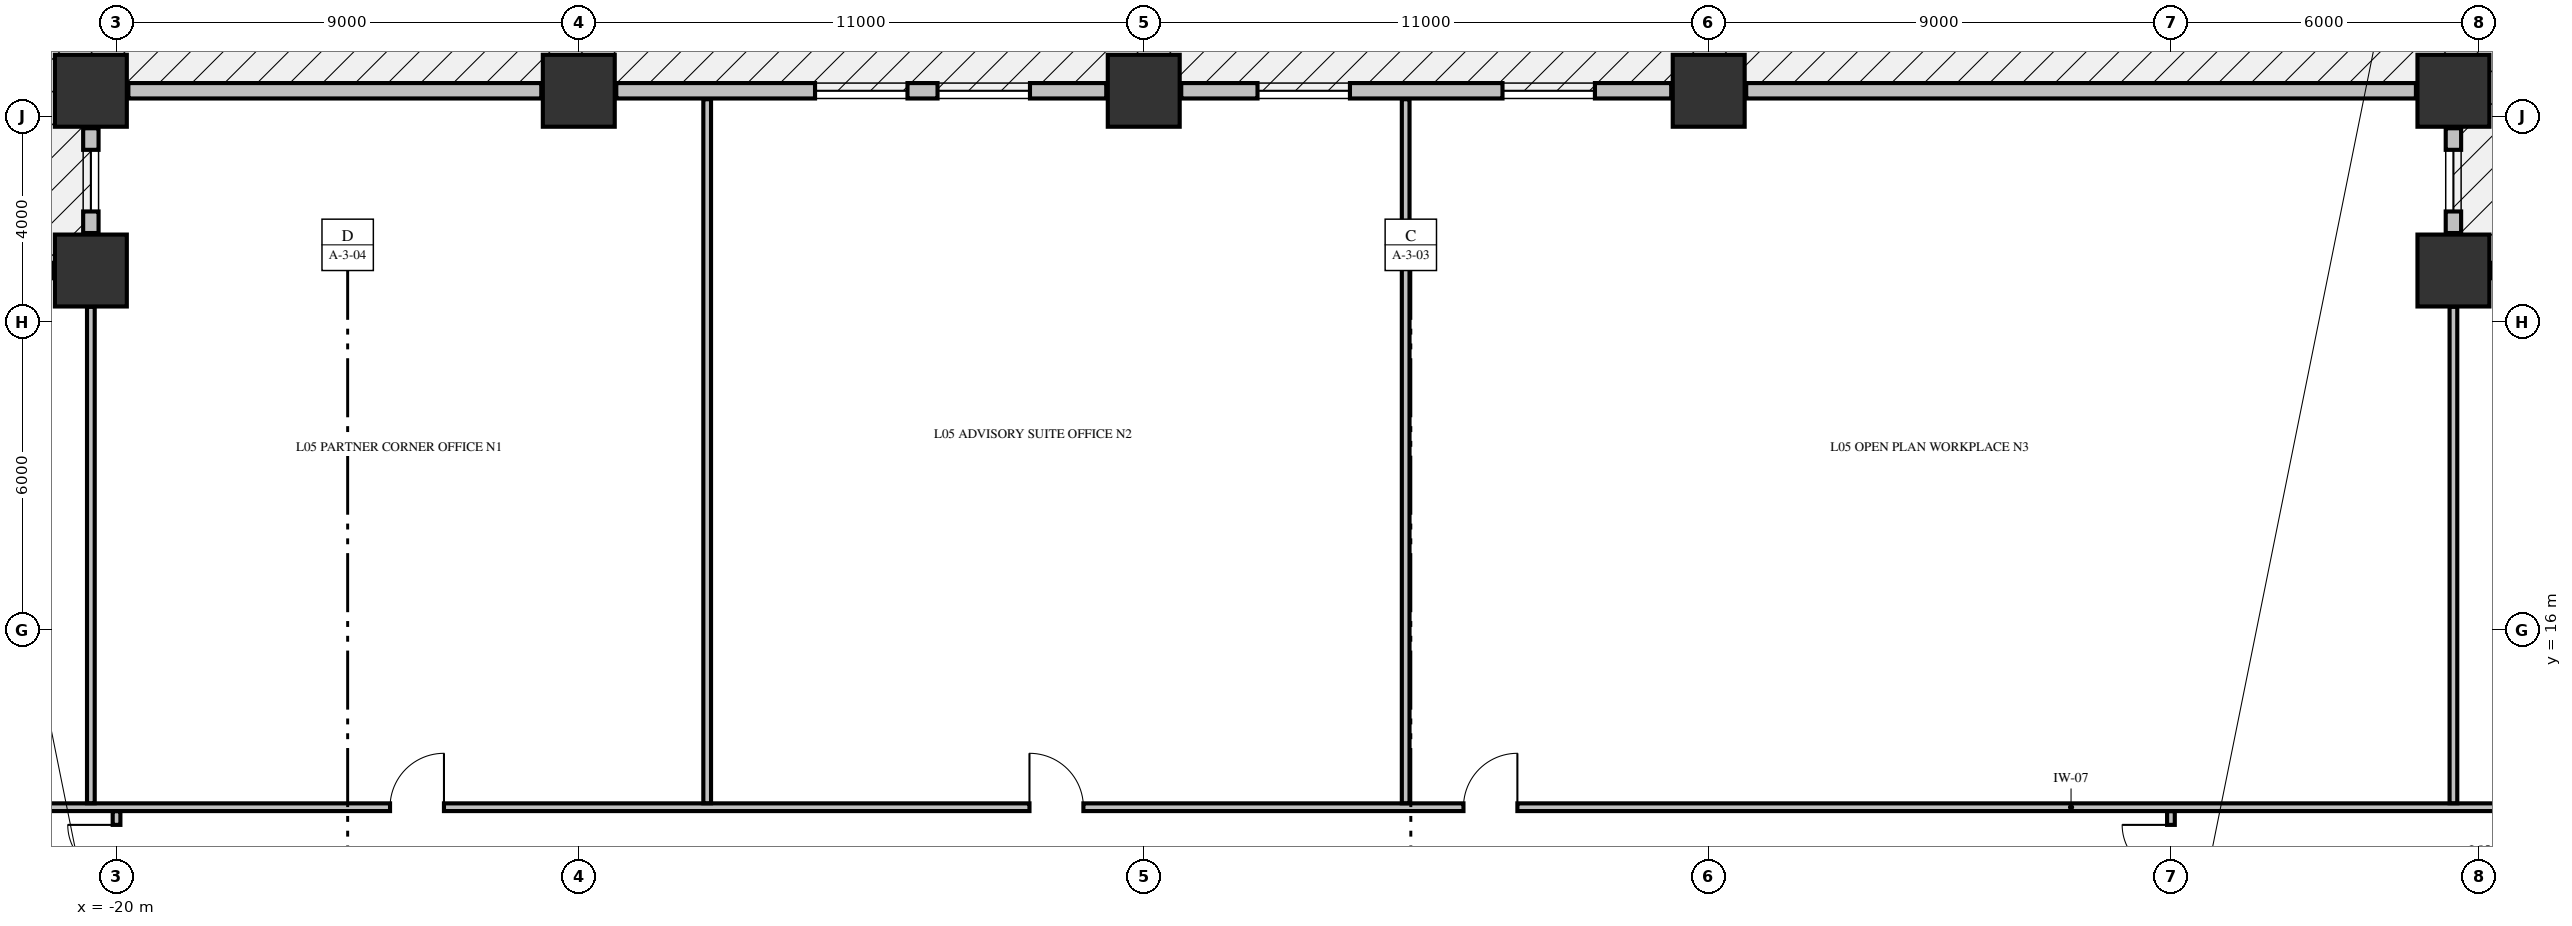
"""IFC4 building model, lengths in metres.
Left out: names, types, materials, properties, quantities, classifications, styles, units other than length and angle.
Written with IfcOpenShell. Run it as: python <this file> out.ifc"""

import sys

from ifc_helpers import new_model, si_unit, direction, frame, frame_2d, origin, origin_2d, place, context, subcontext, project, spatial, rectangle, extrude, element, fill, save


model = new_model("IFC4")
c1 = context("Model", 3, precision=1e-05, world=origin(), true_north=direction((0.0, 1.0)))
c2 = subcontext(c1, "Body", "Model", "MODEL_VIEW")
j1 = project(units=[si_unit("LENGTHUNIT", "METRE"), si_unit("PLANEANGLEUNIT", "RADIAN")], contexts=[c1])
p1 = place(None, origin())
s1 = spatial("IfcSite", under=j1, at=p1, CompositionType="ELEMENT")
p2 = place(p1, origin())
s2 = spatial("IfcBuilding", under=s1, at=p2, CompositionType="ELEMENT")
p3 = place(p2, frame((0.0, 0.0, 27.2)))
s3 = spatial("IfcBuildingStorey", under=s2, at=p3, CompositionType="ELEMENT", Elevation=27.2)
for number, where, z_axis, x_axis in (
    (1, (-20.5, 26.5, -0.45), (0.0, 0.0, 1.0), (1.0, 0.0, 0.0)),
    (2, (-11.0, 26.5, -0.45), (0.0, 0.0, 1.0), (1.0, 0.0, 0.0)),
    (3, (0.0, 26.5, -0.45), (0.0, 0.0, 1.0), (1.0, 0.0, 0.0)),
    (4, (11.0, 26.5, -0.45), (0.0, 0.0, 1.0), (1.0, 0.0, 0.0)),
    (5, (25.5, 26.5, -0.45), (0.0, 0.0, 1.0), (1.0, 0.0, 0.0)),
    (6, (25.5, 23.0, -0.45), (0.0, 0.0, 1.0), (1.0, 0.0, 0.0)),
    (7, (-20.5, 23.0, -0.45), (0.0, 0.0, 1.0), (1.0, 0.0, 0.0)),
):
    element("IfcColumn", number, at=place(p3, frame(where, z_axis=z_axis, x_axis=x_axis)), inside=s3, PredefinedType="COLUMN", context=c2, shape_type="SweptSolid", body=[
        extrude(rectangle(XDim=1.4, YDim=1.4, at=origin_2d()), origin(), (0.0, 0.0, 1.0), 3.77),
    ])
p4 = place(p3, frame((28.27, 23.0, 0.0), z_axis=(0.0, 0.0, 1.0), x_axis=(-1.0, 0.0, 0.0)))
e8 = element("IfcWall", 8, at=p4, inside=s3, PredefinedType="STANDARD", context=c2, shape_type="SweptSolid", body=[
    extrude(rectangle(XDim=2.04, YDim=0.3, at=frame_2d((1.02, 0.0))), origin(), (0.0, 0.0, 1.0), 2.712),
])
p5 = place(p4, frame((0.42, 0.0, 0.82)))
e9 = element("IfcOpeningElement", 9, at=p5, cuts=e8, PredefinedType="OPENING", context=c2, shape_type="SweptSolid", body=[
    extrude(rectangle(XDim=1.2, YDim=1.65, at=frame_2d((0.6, 0.825))), frame((0.0, 0.16, 0.0), z_axis=(0.0, -1.0, 0.0), x_axis=(1.0, 0.0, 0.0)), (0.0, 0.0, 1.0), 0.32),
])
p6 = place(p3, frame((25.5, 23.73, 0.0), z_axis=(0.0, 0.0, 1.0), x_axis=(0.0, 1.0, 0.0)))
e10 = element("IfcWall", 10, at=p6, inside=s3, PredefinedType="STANDARD", context=c2, shape_type="SweptSolid", body=[
    extrude(rectangle(XDim=2.04, YDim=0.3, at=frame_2d((1.02, 0.0))), origin(), (0.0, 0.0, 1.0), 2.712),
])
p7 = place(p6, frame((0.42, 0.0, 0.82)))
e11 = element("IfcOpeningElement", 11, at=p7, cuts=e10, PredefinedType="OPENING", context=c2, shape_type="SweptSolid", body=[
    extrude(rectangle(XDim=1.2, YDim=1.65, at=frame_2d((0.6, 0.825))), frame((0.0, 0.16, 0.0), z_axis=(0.0, -1.0, 0.0), x_axis=(1.0, 0.0, 0.0)), (0.0, 0.0, 1.0), 0.32),
])
p8 = place(p3, frame((-20.5, 25.77, 0.0), z_axis=(0.0, 0.0, 1.0), x_axis=(0.0, -1.0, 0.0)))
e12 = element("IfcWall", 12, at=p8, inside=s3, PredefinedType="STANDARD", context=c2, shape_type="SweptSolid", body=[
    extrude(rectangle(XDim=2.04, YDim=0.3, at=frame_2d((1.02, 0.0))), origin(), (0.0, 0.0, 1.0), 2.712),
])
p9 = place(p8, frame((0.42, 0.0, 0.82)))
e13 = element("IfcOpeningElement", 13, at=p9, cuts=e12, PredefinedType="OPENING", context=c2, shape_type="SweptSolid", body=[
    extrude(rectangle(XDim=1.2, YDim=1.65, at=frame_2d((0.6, 0.825))), frame((0.0, 0.16, 0.0), z_axis=(0.0, -1.0, 0.0), x_axis=(1.0, 0.0, 0.0)), (0.0, 0.0, 1.0), 0.32),
])
p10 = place(p3, frame((-21.23, 23.0, 0.0), z_axis=(0.0, 0.0, 1.0), x_axis=(-1.0, 0.0, 0.0)))
e14 = element("IfcWall", 14, at=p10, inside=s3, PredefinedType="STANDARD", context=c2, shape_type="SweptSolid", body=[
    extrude(rectangle(XDim=2.04, YDim=0.3, at=frame_2d((1.02, 0.0))), origin(), (0.0, 0.0, 1.0), 2.712),
])
p11 = place(p10, frame((0.42, 0.0, 0.82)))
e15 = element("IfcOpeningElement", 15, at=p11, cuts=e14, PredefinedType="OPENING", context=c2, shape_type="SweptSolid", body=[
    extrude(rectangle(XDim=1.2, YDim=1.65, at=frame_2d((0.6, 0.825))), frame((0.0, 0.16, 0.0), z_axis=(0.0, -1.0, 0.0), x_axis=(1.0, 0.0, 0.0)), (0.0, 0.0, 1.0), 0.32),
])
p12 = place(p3, frame((-11.73, 26.5, 0.0), z_axis=(0.0, 0.0, 1.0), x_axis=(-1.0, 0.0, 0.0)))
e16 = element("IfcWall", 16, at=p12, inside=s3, PredefinedType="STANDARD", context=c2, shape_type="SweptSolid", body=[
    extrude(rectangle(XDim=8.04, YDim=0.3, at=frame_2d((4.02, 0.0))), origin(), (0.0, 0.0, 1.0), 2.712),
])
p13 = place(p3, frame((-0.73, 26.5, 0.0), z_axis=(0.0, 0.0, 1.0), x_axis=(-1.0, 0.0, 0.0)))
e17 = element("IfcWall", 17, at=p13, inside=s3, PredefinedType="STANDARD", context=c2, shape_type="SweptSolid", body=[
    extrude(rectangle(XDim=9.54, YDim=0.3, at=frame_2d((4.77, 0.0))), origin(), (0.0, 0.0, 1.0), 2.712),
])
p14 = place(p13, frame((1.485, 0.0, 0.78)))
e18 = element("IfcOpeningElement", 18, at=p14, cuts=e17, PredefinedType="OPENING", context=c2, shape_type="SweptSolid", body=[
    extrude(rectangle(XDim=1.8, YDim=1.72, at=frame_2d((0.9, 0.86))), frame((0.0, 0.16, 0.0), z_axis=(0.0, -1.0, 0.0), x_axis=(1.0, 0.0, 0.0)), (0.0, 0.0, 1.0), 0.32),
])
p15 = place(p13, frame((3.87, 0.0, 0.78)))
e19 = element("IfcOpeningElement", 19, at=p15, cuts=e17, PredefinedType="OPENING", context=c2, shape_type="SweptSolid", body=[
    extrude(rectangle(XDim=1.8, YDim=1.72, at=frame_2d((0.9, 0.86))), frame((0.0, 0.16, 0.0), z_axis=(0.0, -1.0, 0.0), x_axis=(1.0, 0.0, 0.0)), (0.0, 0.0, 1.0), 0.32),
])
p16 = place(p3, frame((10.27, 26.5, 0.0), z_axis=(0.0, 0.0, 1.0), x_axis=(-1.0, 0.0, 0.0)))
e20 = element("IfcWall", 20, at=p16, inside=s3, PredefinedType="STANDARD", context=c2, shape_type="SweptSolid", body=[
    extrude(rectangle(XDim=9.54, YDim=0.3, at=frame_2d((4.77, 0.0))), origin(), (0.0, 0.0, 1.0), 2.712),
])
p17 = place(p16, frame((1.485, 0.0, 0.78)))
e21 = element("IfcOpeningElement", 21, at=p17, cuts=e20, PredefinedType="OPENING", context=c2, shape_type="SweptSolid", body=[
    extrude(rectangle(XDim=1.8, YDim=1.72, at=frame_2d((0.9, 0.86))), frame((0.0, 0.16, 0.0), z_axis=(0.0, -1.0, 0.0), x_axis=(1.0, 0.0, 0.0)), (0.0, 0.0, 1.0), 0.32),
])
p18 = place(p16, frame((6.255, 0.0, 0.78)))
e22 = element("IfcOpeningElement", 22, at=p18, cuts=e20, PredefinedType="OPENING", context=c2, shape_type="SweptSolid", body=[
    extrude(rectangle(XDim=1.8, YDim=1.72, at=frame_2d((0.9, 0.86))), frame((0.0, 0.16, 0.0), z_axis=(0.0, -1.0, 0.0), x_axis=(1.0, 0.0, 0.0)), (0.0, 0.0, 1.0), 0.32),
])
p19 = place(p3, frame((24.77, 26.5, 0.0), z_axis=(0.0, 0.0, 1.0), x_axis=(-1.0, 0.0, 0.0)))
e23 = element("IfcWall", 23, at=p19, inside=s3, PredefinedType="STANDARD", context=c2, shape_type="SweptSolid", body=[
    extrude(rectangle(XDim=13.04, YDim=0.3, at=frame_2d((6.52, 0.0))), origin(), (0.0, 0.0, 1.0), 2.712),
])
p20 = place(p3, frame((-23.835, 12.55, 0.0), z_axis=(0.0, 0.0, 1.0), x_axis=(1.0, 0.0, 0.0)))
e24 = element("IfcWall", 24, at=p20, inside=s3, PredefinedType="PARTITIONING", context=c2, shape_type="SweptSolid", body=[
    extrude(rectangle(XDim=52.67, YDim=0.15, at=frame_2d((26.335, 0.0))), origin(), (0.0, 0.0, 1.0), 3.32),
])
p21 = place(p20, frame((9.16, 0.0, 0.0)))
e25 = element("IfcOpeningElement", 25, at=p21, cuts=e24, PredefinedType="OPENING", context=c2, shape_type="SweptSolid", body=[
    extrude(rectangle(XDim=1.05, YDim=2.15, at=frame_2d((0.525, 1.075))), frame((0.0, 0.085, 0.0), z_axis=(0.0, -1.0, 0.0), x_axis=(1.0, 0.0, 0.0)), (0.0, 0.0, 1.0), 0.17),
])
p22 = place(p20, frame((21.61, 0.0, 0.0)))
e26 = element("IfcOpeningElement", 26, at=p22, cuts=e24, PredefinedType="OPENING", context=c2, shape_type="SweptSolid", body=[
    extrude(rectangle(XDim=1.05, YDim=2.15, at=frame_2d((0.525, 1.075))), frame((0.0, 0.085, 0.0), z_axis=(0.0, -1.0, 0.0), x_axis=(1.0, 0.0, 0.0)), (0.0, 0.0, 1.0), 0.17),
])
p23 = place(p20, frame((30.06, 0.0, 0.0)))
e27 = element("IfcOpeningElement", 27, at=p23, cuts=e24, PredefinedType="OPENING", context=c2, shape_type="SweptSolid", body=[
    extrude(rectangle(XDim=1.05, YDim=2.15, at=frame_2d((0.525, 1.075))), frame((0.0, 0.085, 0.0), z_axis=(0.0, -1.0, 0.0), x_axis=(1.0, 0.0, 0.0)), (0.0, 0.0, 1.0), 0.17),
])
p24 = place(p3, frame((-20.5, 12.628, 0.0), z_axis=(0.0, 0.0, 1.0), x_axis=(0.0, 1.0, 0.0)))
e28 = element("IfcWall", 28, at=p24, inside=s3, PredefinedType="PARTITIONING", context=c2, shape_type="SweptSolid", body=[
    extrude(rectangle(XDim=9.666, YDim=0.15, at=frame_2d((4.833, 0.0))), origin(), (0.0, 0.0, 1.0), 3.32),
])
p25 = place(p3, frame((-20.0, 11.106, 0.0), z_axis=(0.0, 0.0, 1.0), x_axis=(0.0, 1.0, 0.0)))
e29 = element("IfcWall", 29, at=p25, inside=s3, PredefinedType="PARTITIONING", context=c2, shape_type="SweptSolid", body=[
    extrude(rectangle(XDim=1.366, YDim=0.15, at=frame_2d((0.683, 0.0))), origin(), (0.0, 0.0, 1.0), 3.32),
])
p26 = place(p25, frame((0.15, 0.0, 0.0)))
e30 = element("IfcOpeningElement", 30, at=p26, cuts=e29, PredefinedType="OPENING", context=c2, shape_type="SweptSolid", body=[
    extrude(rectangle(XDim=0.95, YDim=2.15, at=frame_2d((0.475, 1.075))), frame((0.0, 0.085, 0.0), z_axis=(0.0, -1.0, 0.0), x_axis=(1.0, 0.0, 0.0)), (0.0, 0.0, 1.0), 0.17),
])
for number, where, z_axis, x_axis in (
    (31, (-8.5, 12.628, 0.0), (0.0, 0.0, 1.0), (0.0, 1.0, 0.0)),
    (32, (5.1, 12.628, 0.0), (0.0, 0.0, 1.0), (0.0, 1.0, 0.0)),
):
    element("IfcWall", number, at=place(p3, frame(where, z_axis=z_axis, x_axis=x_axis)), inside=s3, PredefinedType="PARTITIONING", context=c2, shape_type="SweptSolid", body=[
        extrude(rectangle(XDim=13.707, YDim=0.15, at=frame_2d((6.854, 0.0))), origin(), (0.0, 0.0, 1.0), 3.32),
    ])
p27 = place(p3, frame((20.0, 11.106, 0.0), z_axis=(0.0, 0.0, 1.0), x_axis=(0.0, 1.0, 0.0)))
e33 = element("IfcWall", 33, at=p27, inside=s3, PredefinedType="PARTITIONING", context=c2, shape_type="SweptSolid", body=[
    extrude(rectangle(XDim=1.366, YDim=0.15, at=frame_2d((0.683, 0.0))), origin(), (0.0, 0.0, 1.0), 2.66),
])
p28 = place(p27, frame((0.15, 0.0, 0.0)))
e34 = element("IfcOpeningElement", 34, at=p28, cuts=e33, PredefinedType="OPENING", context=c2, shape_type="SweptSolid", body=[
    extrude(rectangle(XDim=0.95, YDim=2.15, at=frame_2d((0.475, 1.075))), frame((0.0, 0.085, 0.0), z_axis=(0.0, -1.0, 0.0), x_axis=(1.0, 0.0, 0.0)), (0.0, 0.0, 1.0), 0.17),
])
p29 = place(p3, frame((25.5, 12.628, 0.0), z_axis=(0.0, 0.0, 1.0), x_axis=(0.0, 1.0, 0.0)))
e35 = element("IfcWall", 35, at=p29, inside=s3, PredefinedType="PARTITIONING", context=c2, shape_type="SweptSolid", body=[
    extrude(rectangle(XDim=9.666, YDim=0.15, at=frame_2d((4.833, 0.0))), origin(), (0.0, 0.0, 1.0), 3.32),
])
p30 = place(p7, origin())
e36 = element("IfcWindow", 36, at=p30, inside=s3, PartitioningType="SINGLE_PANEL", PredefinedType="WINDOW", context=c2, shape_type="SweptSolid", body=[
    extrude(rectangle(XDim=1.2, YDim=1.65, at=frame_2d((0.6, 0.825))), frame((0.0, 0.03, 0.0), z_axis=(0.0, -1.0, 0.0), x_axis=(1.0, 0.0, 0.0)), (0.0, 0.0, 1.0), 0.06),
])
fill(e11, e36)
p31 = place(p9, origin())
e37 = element("IfcWindow", 37, at=p31, inside=s3, PartitioningType="SINGLE_PANEL", PredefinedType="WINDOW", context=c2, shape_type="SweptSolid", body=[
    extrude(rectangle(XDim=1.2, YDim=1.65, at=frame_2d((0.6, 0.825))), frame((0.0, 0.03, 0.0), z_axis=(0.0, -1.0, 0.0), x_axis=(1.0, 0.0, 0.0)), (0.0, 0.0, 1.0), 0.06),
])
fill(e13, e37)
p32 = place(p14, origin())
e38 = element("IfcWindow", 38, at=p32, inside=s3, PartitioningType="SINGLE_PANEL", PredefinedType="WINDOW", context=c2, shape_type="SweptSolid", body=[
    extrude(rectangle(XDim=1.8, YDim=1.72, at=frame_2d((0.9, 0.86))), frame((0.0, 0.03, 0.0), z_axis=(0.0, -1.0, 0.0), x_axis=(1.0, 0.0, 0.0)), (0.0, 0.0, 1.0), 0.06),
])
fill(e18, e38)
p33 = place(p15, origin())
e39 = element("IfcWindow", 39, at=p33, inside=s3, PartitioningType="SINGLE_PANEL", PredefinedType="WINDOW", context=c2, shape_type="SweptSolid", body=[
    extrude(rectangle(XDim=1.8, YDim=1.72, at=frame_2d((0.9, 0.86))), frame((0.0, 0.03, 0.0), z_axis=(0.0, -1.0, 0.0), x_axis=(1.0, 0.0, 0.0)), (0.0, 0.0, 1.0), 0.06),
])
fill(e19, e39)
p34 = place(p17, origin())
e40 = element("IfcWindow", 40, at=p34, inside=s3, PartitioningType="SINGLE_PANEL", PredefinedType="WINDOW", context=c2, shape_type="SweptSolid", body=[
    extrude(rectangle(XDim=1.8, YDim=1.72, at=frame_2d((0.9, 0.86))), frame((0.0, 0.03, 0.0), z_axis=(0.0, -1.0, 0.0), x_axis=(1.0, 0.0, 0.0)), (0.0, 0.0, 1.0), 0.06),
])
fill(e21, e40)
p35 = place(p18, origin())
e41 = element("IfcWindow", 41, at=p35, inside=s3, PartitioningType="SINGLE_PANEL", PredefinedType="WINDOW", context=c2, shape_type="SweptSolid", body=[
    extrude(rectangle(XDim=1.8, YDim=1.72, at=frame_2d((0.9, 0.86))), frame((0.0, 0.03, 0.0), z_axis=(0.0, -1.0, 0.0), x_axis=(1.0, 0.0, 0.0)), (0.0, 0.0, 1.0), 0.06),
])
fill(e22, e41)
p36 = place(p21, origin())
e42 = element("IfcDoor", 42, at=p36, inside=s3, OperationType="SINGLE_SWING_RIGHT", PredefinedType="DOOR", context=c2, shape_type="SweptSolid", body=[
    extrude(rectangle(XDim=1.05, YDim=2.15, at=frame_2d((0.525, 1.075))), frame((0.0, 0.025, 0.0), z_axis=(0.0, -1.0, 0.0), x_axis=(1.0, 0.0, 0.0)), (0.0, 0.0, 1.0), 0.05),
])
fill(e25, e42)
p37 = place(p22, origin())
e43 = element("IfcDoor", 43, at=p37, inside=s3, OperationType="SINGLE_SWING_LEFT", PredefinedType="DOOR", context=c2, shape_type="SweptSolid", body=[
    extrude(rectangle(XDim=1.05, YDim=2.15, at=frame_2d((0.525, 1.075))), frame((0.0, 0.025, 0.0), z_axis=(0.0, -1.0, 0.0), x_axis=(1.0, 0.0, 0.0)), (0.0, 0.0, 1.0), 0.05),
])
fill(e26, e43)
p38 = place(p23, origin())
e44 = element("IfcDoor", 44, at=p38, inside=s3, OperationType="SINGLE_SWING_RIGHT", PredefinedType="DOOR", context=c2, shape_type="SweptSolid", body=[
    extrude(rectangle(XDim=1.05, YDim=2.15, at=frame_2d((0.525, 1.075))), frame((0.0, 0.025, 0.0), z_axis=(0.0, -1.0, 0.0), x_axis=(1.0, 0.0, 0.0)), (0.0, 0.0, 1.0), 0.05),
])
fill(e27, e44)
p39 = place(p26, origin())
e45 = element("IfcDoor", 45, at=p39, inside=s3, OperationType="SINGLE_SWING_RIGHT", PredefinedType="DOOR", context=c2, shape_type="SweptSolid", body=[
    extrude(rectangle(XDim=0.95, YDim=2.15, at=frame_2d((0.475, 1.075))), frame((0.0, 0.025, 0.0), z_axis=(0.0, -1.0, 0.0), x_axis=(1.0, 0.0, 0.0)), (0.0, 0.0, 1.0), 0.05),
])
fill(e30, e45)
p40 = place(p28, origin())
e46 = element("IfcDoor", 46, at=p40, inside=s3, OperationType="SINGLE_SWING_RIGHT", PredefinedType="DOOR", context=c2, shape_type="SweptSolid", body=[
    extrude(rectangle(XDim=0.95, YDim=2.15, at=frame_2d((0.475, 1.075))), frame((0.0, 0.025, 0.0), z_axis=(0.0, -1.0, 0.0), x_axis=(1.0, 0.0, 0.0)), (0.0, 0.0, 1.0), 0.05),
])
fill(e34, e46)
save(model, sys.argv[1])
